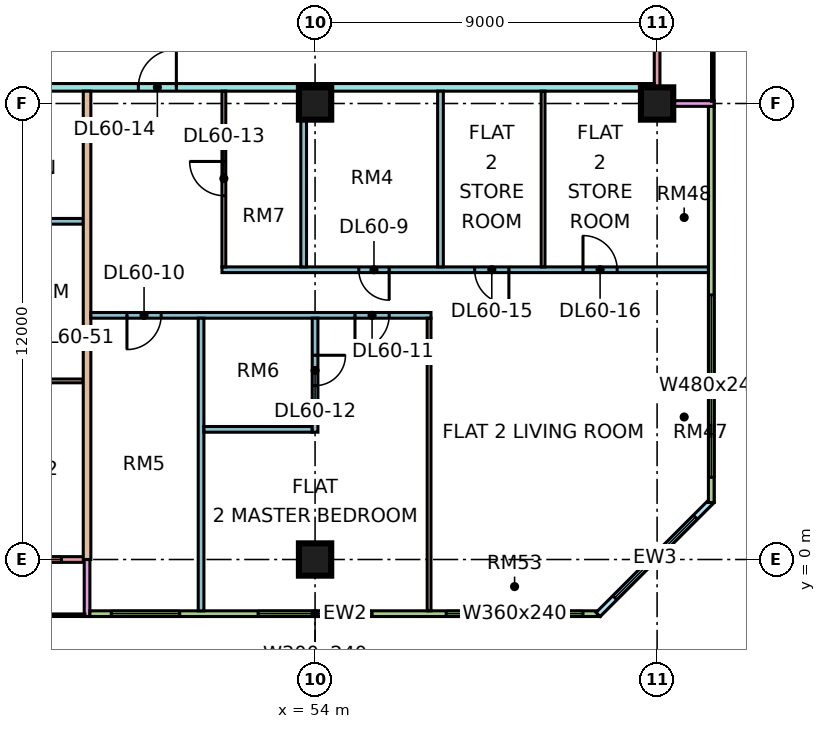
"""IFC4 building model, lengths in metres.
Left out: names, types, materials, properties, quantities, classifications, styles, units other than length and angle.
Written with IfcOpenShell. Run it as: python <this file> out.ifc"""

import sys

from ifc_helpers import new_model, si_unit, direction, frame, frame_2d, origin, origin_2d, place, context, subcontext, project, spatial, rectangle, extrude, element, fill, save


model = new_model("IFC4")
c1 = context("Model", 3, precision=1e-05, world=origin(), true_north=direction((0.0, 1.0)))
c2 = subcontext(c1, "Body", "Model", "MODEL_VIEW")
j1 = project(units=[si_unit("LENGTHUNIT", "METRE"), si_unit("PLANEANGLEUNIT", "RADIAN")], contexts=[c1])
p1 = place(None, origin())
s1 = spatial("IfcSite", under=j1, at=p1, CompositionType="ELEMENT")
p2 = place(p1, origin())
s2 = spatial("IfcBuilding", under=s1, at=p2, CompositionType="ELEMENT")
p3 = place(p2, frame((0.0, 0.0, 252.9)))
s3 = spatial("IfcBuildingStorey", under=s2, at=p3, CompositionType="ELEMENT", Elevation=252.9)
for number, where, z_axis, x_axis in (
    (1, (54.0, 0.0, 0.0), (0.0, 0.0, 1.0), (1.0, 0.0, 0.0)),
    (2, (54.0, 12.0, 0.0), (0.0, 0.0, 1.0), (1.0, 0.0, 0.0)),
    (3, (63.0, 12.0, 0.0), (0.0, 0.0, 1.0), (1.0, 0.0, 0.0)),
):
    element("IfcColumn", number, at=place(p3, frame(where, z_axis=z_axis, x_axis=x_axis)), inside=s3, PredefinedType="COLUMN", context=c2, shape_type="SweptSolid", body=[
        extrude(rectangle(XDim=0.85, YDim=0.85, at=origin_2d()), origin(), (0.0, 0.0, 1.0), 3.75),
    ])
p4 = place(p3, frame((36.075, 0.0, 0.0), z_axis=(0.0, 0.0, 1.0), x_axis=(1.0, 0.0, 0.0)))
e4 = element("IfcWall", 4, at=p4, inside=s3, PredefinedType="SOLIDWALL", context=c2, shape_type="SweptSolid", body=[
    extrude(rectangle(XDim=11.85, YDim=0.15, at=frame_2d((5.925, 0.0))), origin(), (0.0, 0.0, 1.0), 3.3),
])
p5 = place(p4, frame((2.288, 0.0, 0.0)))
e5 = element("IfcOpeningElement", 5, at=p5, cuts=e4, PredefinedType="OPENING", context=c2, shape_type="SweptSolid", body=[
    extrude(rectangle(XDim=1.8, YDim=2.4, at=frame_2d((0.9, 1.2))), frame((0.0, 0.085, 0.0), z_axis=(0.0, -1.0, 0.0), x_axis=(1.0, 0.0, 0.0)), (0.0, 0.0, 1.0), 0.17),
])
p6 = place(p4, frame((6.562, 0.0, 0.45)))
e6 = element("IfcOpeningElement", 6, at=p6, cuts=e4, PredefinedType="OPENING", context=c2, shape_type="SweptSolid", body=[
    extrude(rectangle(XDim=1.2, YDim=2.4, at=frame_2d((0.6, 1.2))), frame((0.0, 0.085, 0.0), z_axis=(0.0, -1.0, 0.0), x_axis=(1.0, 0.0, 0.0)), (0.0, 0.0, 1.0), 0.17),
])
p7 = place(p4, frame((10.05, 0.0, 0.45)))
e7 = element("IfcOpeningElement", 7, at=p7, cuts=e4, PredefinedType="OPENING", context=c2, shape_type="SweptSolid", body=[
    extrude(rectangle(XDim=1.2, YDim=2.4, at=frame_2d((0.6, 1.2))), frame((0.0, 0.085, 0.0), z_axis=(0.0, -1.0, 0.0), x_axis=(1.0, 0.0, 0.0)), (0.0, 0.0, 1.0), 0.17),
])
p8 = place(p3, frame((48.0, -1.5, 0.0), z_axis=(0.0, 0.0, 1.0), x_axis=(0.0, 1.0, 0.0)))
e8 = element("IfcWall", 8, at=p8, inside=s3, PredefinedType="SOLIDWALL", context=c2, shape_type="SweptSolid", body=[
    extrude(rectangle(XDim=1.5, YDim=0.15, at=frame_2d((0.75, 0.0))), origin(), (0.0, 0.0, 1.0), 3.3),
])
p9 = place(p3, frame((48.075, -1.425, 0.0), z_axis=(0.0, 0.0, 1.0), x_axis=(1.0, 0.0, 0.0)))
e9 = element("IfcWall", 9, at=p9, inside=s3, PredefinedType="SOLIDWALL", context=c2, shape_type="SweptSolid", body=[
    extrude(rectangle(XDim=13.425, YDim=0.15, at=frame_2d((6.712, 0.0))), origin(), (0.0, 0.0, 1.0), 3.3),
])
p10 = place(p9, frame((0.562, 0.0, 0.45)))
e10 = element("IfcOpeningElement", 10, at=p10, cuts=e9, PredefinedType="OPENING", context=c2, shape_type="SweptSolid", body=[
    extrude(rectangle(XDim=1.8, YDim=2.4, at=frame_2d((0.9, 1.2))), frame((0.0, 0.085, 0.0), z_axis=(0.0, -1.0, 0.0), x_axis=(1.0, 0.0, 0.0)), (0.0, 0.0, 1.0), 0.17),
])
p11 = place(p9, frame((4.425, 0.0, 0.45)))
e11 = element("IfcOpeningElement", 11, at=p11, cuts=e9, PredefinedType="OPENING", context=c2, shape_type="SweptSolid", body=[
    extrude(rectangle(XDim=3.0, YDim=2.4, at=frame_2d((1.5, 1.2))), frame((0.0, 0.085, 0.0), z_axis=(0.0, -1.0, 0.0), x_axis=(1.0, 0.0, 0.0)), (0.0, 0.0, 1.0), 0.17),
])
p12 = place(p9, frame((9.375, 0.0, 0.45)))
e12 = element("IfcOpeningElement", 12, at=p12, cuts=e9, PredefinedType="OPENING", context=c2, shape_type="SweptSolid", body=[
    extrude(rectangle(XDim=3.6, YDim=2.4, at=frame_2d((1.8, 1.2))), frame((0.0, 0.085, 0.0), z_axis=(0.0, -1.0, 0.0), x_axis=(1.0, 0.0, 0.0)), (0.0, 0.0, 1.0), 0.17),
])
p13 = place(p3, frame((61.447, -1.447, 0.0), z_axis=(0.0, 0.0, 1.0), x_axis=(0.707106781187, 0.707106781187, 0.0)))
e13 = element("IfcWall", 13, at=p13, inside=s3, PredefinedType="SOLIDWALL", context=c2, shape_type="SweptSolid", body=[
    extrude(rectangle(XDim=4.243, YDim=0.15, at=frame_2d((2.121, 0.0))), origin(), (0.0, 0.0, 1.0), 3.3),
])
p14 = place(p13, frame((0.621, 0.0, 0.45)))
e14 = element("IfcOpeningElement", 14, at=p14, cuts=e13, PredefinedType="OPENING", context=c2, shape_type="SweptSolid", body=[
    extrude(rectangle(XDim=3.0, YDim=2.4, at=frame_2d((1.5, 1.2))), frame((0.0, 0.085, 0.0), z_axis=(0.0, -1.0, 0.0), x_axis=(1.0, 0.0, 0.0)), (0.0, 0.0, 1.0), 0.17),
])
p15 = place(p3, frame((64.425, 1.5, 0.0), z_axis=(0.0, 0.0, 1.0), x_axis=(0.0, 1.0, 0.0)))
e15 = element("IfcWall", 15, at=p15, inside=s3, PredefinedType="SOLIDWALL", context=c2, shape_type="SweptSolid", body=[
    extrude(rectangle(XDim=10.425, YDim=0.15, at=frame_2d((5.212, 0.0))), origin(), (0.0, 0.0, 1.0), 3.3),
])
p16 = place(p15, frame((0.663, 0.0, 0.45)))
e16 = element("IfcOpeningElement", 16, at=p16, cuts=e15, PredefinedType="OPENING", context=c2, shape_type="SweptSolid", body=[
    extrude(rectangle(XDim=4.8, YDim=2.4, at=frame_2d((2.4, 1.2))), frame((0.0, 0.085, 0.0), z_axis=(0.0, -1.0, 0.0), x_axis=(1.0, 0.0, 0.0)), (0.0, 0.0, 1.0), 0.17),
])
p17 = place(p3, frame((63.0, 12.075, 0.0), z_axis=(0.0, 0.0, 1.0), x_axis=(0.0, 1.0, 0.0)))
e17 = element("IfcWall", 17, at=p17, inside=s3, PredefinedType="SOLIDWALL", context=c2, shape_type="SweptSolid", body=[
    extrude(rectangle(XDim=10.35, YDim=0.15, at=frame_2d((5.175, 0.0))), origin(), (0.0, 0.0, 1.0), 3.3),
])
p18 = place(p17, frame((4.875, 0.0, 0.0)))
e18 = element("IfcOpeningElement", 18, at=p18, cuts=e17, PredefinedType="OPENING", context=c2, shape_type="SweptSolid", body=[
    extrude(rectangle(XDim=1.8, YDim=2.4, at=frame_2d((0.9, 1.2))), frame((0.0, 0.085, 0.0), z_axis=(0.0, -1.0, 0.0), x_axis=(1.0, 0.0, 0.0)), (0.0, 0.0, 1.0), 0.17),
])
p19 = place(p17, frame((8.587, 0.0, 0.45)))
e19 = element("IfcOpeningElement", 19, at=p19, cuts=e17, PredefinedType="OPENING", context=c2, shape_type="SweptSolid", body=[
    extrude(rectangle(XDim=1.2, YDim=2.4, at=frame_2d((0.6, 1.2))), frame((0.0, 0.085, 0.0), z_axis=(0.0, -1.0, 0.0), x_axis=(1.0, 0.0, 0.0)), (0.0, 0.0, 1.0), 0.17),
])
p20 = place(p3, frame((64.5, 12.0, 0.0), z_axis=(0.0, 0.0, 1.0), x_axis=(-1.0, 0.0, 0.0)))
e20 = element("IfcWall", 20, at=p20, inside=s3, PredefinedType="SOLIDWALL", context=c2, shape_type="SweptSolid", body=[
    extrude(rectangle(XDim=1.5, YDim=0.15, at=frame_2d((0.75, 0.0))), origin(), (0.0, 0.0, 1.0), 3.3),
])
p21 = place(p3, frame((33.05, 4.7, 0.0), z_axis=(0.0, 0.0, 1.0), x_axis=(1.0, 0.0, 0.0)))
e21 = element("IfcWall", 21, at=p21, inside=s3, PredefinedType="PARTITIONING", context=c2, shape_type="SweptSolid", body=[
    extrude(rectangle(XDim=14.85, YDim=0.1, at=frame_2d((7.425, 0.0))), origin(), (0.0, 0.0, 1.0), 3.3),
])
p22 = place(p21, frame((10.0, 0.0, 0.0)))
e22 = element("IfcOpeningElement", 22, at=p22, cuts=e21, PredefinedType="OPENING", context=c2, shape_type="SweptSolid", body=[
    extrude(rectangle(XDim=0.9, YDim=2.1, at=frame_2d((0.45, 1.05))), frame((0.0, 0.06, 0.0), z_axis=(0.0, -1.0, 0.0), x_axis=(1.0, 0.0, 0.0)), (0.0, 0.0, 1.0), 0.12),
])
p23 = place(p21, frame((13.0, 0.0, 0.0)))
e23 = element("IfcOpeningElement", 23, at=p23, cuts=e21, PredefinedType="OPENING", context=c2, shape_type="SweptSolid", body=[
    extrude(rectangle(XDim=0.9, YDim=2.1, at=frame_2d((0.45, 1.05))), frame((0.0, 0.06, 0.0), z_axis=(0.0, -1.0, 0.0), x_axis=(1.0, 0.0, 0.0)), (0.0, 0.0, 1.0), 0.12),
])
p24 = place(p21, frame((4.0, 0.0, 0.0)))
e24 = element("IfcOpeningElement", 24, at=p24, cuts=e21, PredefinedType="OPENING", context=c2, shape_type="SweptSolid", body=[
    extrude(rectangle(XDim=0.9, YDim=2.1, at=frame_2d((0.45, 1.05))), frame((0.0, 0.06, 0.0), z_axis=(0.0, -1.0, 0.0), x_axis=(1.0, 0.0, 0.0)), (0.0, 0.0, 1.0), 0.12),
])
p25 = place(p3, frame((40.65, 12.425, 0.0), z_axis=(0.0, 0.0, 1.0), x_axis=(1.0, 0.0, 0.0)))
e25 = element("IfcWall", 25, at=p25, inside=s3, PredefinedType="PARTITIONING", context=c2, shape_type="SweptSolid", body=[
    extrude(rectangle(XDim=22.276, YDim=0.2, at=frame_2d((11.138, 0.0))), origin(), (0.0, 0.0, 1.0), 3.3),
])
p26 = place(p25, frame((8.7, 0.0, 0.0)))
e26 = element("IfcOpeningElement", 26, at=p26, cuts=e25, PredefinedType="OPENING", context=c2, shape_type="SweptSolid", body=[
    extrude(rectangle(XDim=1.0, YDim=2.1, at=frame_2d((0.5, 1.05))), frame((0.0, 0.11, 0.0), z_axis=(0.0, -1.0, 0.0), x_axis=(1.0, 0.0, 0.0)), (0.0, 0.0, 1.0), 0.22),
])
p27 = place(p25, frame((1.05, 0.0, 0.0)))
e27 = element("IfcOpeningElement", 27, at=p27, cuts=e25, PredefinedType="OPENING", context=c2, shape_type="SweptSolid", body=[
    extrude(rectangle(XDim=1.0, YDim=2.1, at=frame_2d((0.5, 1.05))), frame((0.0, 0.11, 0.0), z_axis=(0.0, -1.0, 0.0), x_axis=(1.0, 0.0, 0.0)), (0.0, 0.0, 1.0), 0.22),
])
p28 = place(p3, frame((43.725, 5.9, 0.0), z_axis=(0.0, 0.0, 1.0), x_axis=(1.0, 0.0, 0.0)))
e28 = element("IfcWall", 28, at=p28, inside=s3, PredefinedType="PARTITIONING", context=c2, shape_type="SweptSolid", body=[
    extrude(rectangle(XDim=4.175, YDim=0.15, at=frame_2d((2.087, 0.0))), origin(), (0.0, 0.0, 1.0), 3.3),
])
p29 = place(p28, frame((1.675, 0.0, 0.0)))
e29 = element("IfcOpeningElement", 29, at=p29, cuts=e28, PredefinedType="OPENING", context=c2, shape_type="SweptSolid", body=[
    extrude(rectangle(XDim=0.8, YDim=2.1, at=frame_2d((0.4, 1.05))), frame((0.0, 0.085, 0.0), z_axis=(0.0, -1.0, 0.0), x_axis=(1.0, 0.0, 0.0)), (0.0, 0.0, 1.0), 0.17),
])
p30 = place(p3, frame((43.725, 8.9, 0.0), z_axis=(0.0, 0.0, 1.0), x_axis=(1.0, 0.0, 0.0)))
e30 = element("IfcWall", 30, at=p30, inside=s3, PredefinedType="PARTITIONING", context=c2, shape_type="SweptSolid", body=[
    extrude(rectangle(XDim=4.175, YDim=0.15, at=frame_2d((2.087, 0.0))), origin(), (0.0, 0.0, 1.0), 3.3),
])
p31 = place(p3, frame((48.0, 0.0, 0.0), z_axis=(0.0, 0.0, 1.0), x_axis=(0.0, 1.0, 0.0)))
e31 = element("IfcWall", 31, at=p31, inside=s3, PredefinedType="PARTITIONING", context=c2, shape_type="SweptSolid", body=[
    extrude(rectangle(XDim=12.325, YDim=0.2, at=frame_2d((6.163, 0.0))), origin(), (0.0, 0.0, 1.0), 3.3),
])
p32 = place(p3, frame((48.1, 6.425, 0.0), z_axis=(0.0, 0.0, 1.0), x_axis=(1.0, 0.0, 0.0)))
e32 = element("IfcWall", 32, at=p32, inside=s3, PredefinedType="PARTITIONING", context=c2, shape_type="SweptSolid", body=[
    extrude(rectangle(XDim=8.95, YDim=0.15, at=frame_2d((4.475, 0.0))), origin(), (0.0, 0.0, 1.0), 3.3),
])
p33 = place(p32, frame((0.95, 0.0, 0.0)))
e33 = element("IfcOpeningElement", 33, at=p33, cuts=e32, PredefinedType="OPENING", context=c2, shape_type="SweptSolid", body=[
    extrude(rectangle(XDim=0.9, YDim=2.1, at=frame_2d((0.45, 1.05))), frame((0.0, 0.085, 0.0), z_axis=(0.0, -1.0, 0.0), x_axis=(1.0, 0.0, 0.0)), (0.0, 0.0, 1.0), 0.17),
])
p34 = place(p32, frame((6.95, 0.0, 0.0)))
e34 = element("IfcOpeningElement", 34, at=p34, cuts=e32, PredefinedType="OPENING", context=c2, shape_type="SweptSolid", body=[
    extrude(rectangle(XDim=0.9, YDim=2.1, at=frame_2d((0.45, 1.05))), frame((0.0, 0.085, 0.0), z_axis=(0.0, -1.0, 0.0), x_axis=(1.0, 0.0, 0.0)), (0.0, 0.0, 1.0), 0.17),
])
p35 = place(p3, frame((51.0, -1.351, 0.0), z_axis=(0.0, 0.0, 1.0), x_axis=(0.0, 1.0, 0.0)))
e35 = element("IfcWall", 35, at=p35, inside=s3, PredefinedType="PARTITIONING", context=c2, shape_type="SweptSolid", body=[
    extrude(rectangle(XDim=7.701, YDim=0.15, at=frame_2d((3.851, 0.0))), origin(), (0.0, 0.0, 1.0), 3.3),
])
p36 = place(p3, frame((51.075, 3.425, 0.0), z_axis=(0.0, 0.0, 1.0), x_axis=(1.0, 0.0, 0.0)))
e36 = element("IfcWall", 36, at=p36, inside=s3, PredefinedType="PARTITIONING", context=c2, shape_type="SweptSolid", body=[
    extrude(rectangle(XDim=2.85, YDim=0.15, at=frame_2d((1.425, 0.0))), origin(), (0.0, 0.0, 1.0), 3.3),
])
p37 = place(p3, frame((51.55, 7.625, 0.0), z_axis=(0.0, 0.0, 1.0), x_axis=(1.0, 0.0, 0.0)))
e37 = element("IfcWall", 37, at=p37, inside=s3, PredefinedType="PARTITIONING", context=c2, shape_type="SweptSolid", body=[
    extrude(rectangle(XDim=12.8, YDim=0.15, at=frame_2d((6.4, 0.0))), origin(), (0.0, 0.0, 1.0), 3.3),
])
p38 = place(p37, frame((3.6, 0.0, 0.0)))
e38 = element("IfcOpeningElement", 38, at=p38, cuts=e37, PredefinedType="OPENING", context=c2, shape_type="SweptSolid", body=[
    extrude(rectangle(XDim=0.8, YDim=2.1, at=frame_2d((0.4, 1.05))), frame((0.0, 0.085, 0.0), z_axis=(0.0, -1.0, 0.0), x_axis=(1.0, 0.0, 0.0)), (0.0, 0.0, 1.0), 0.17),
])
p39 = place(p37, frame((6.65, 0.0, 0.0)))
e39 = element("IfcOpeningElement", 39, at=p39, cuts=e37, PredefinedType="OPENING", context=c2, shape_type="SweptSolid", body=[
    extrude(rectangle(XDim=0.9, YDim=2.1, at=frame_2d((0.45, 1.05))), frame((0.0, 0.085, 0.0), z_axis=(0.0, -1.0, 0.0), x_axis=(1.0, 0.0, 0.0)), (0.0, 0.0, 1.0), 0.17),
])
p40 = place(p37, frame((9.5, 0.0, 0.0)))
e40 = element("IfcOpeningElement", 40, at=p40, cuts=e37, PredefinedType="OPENING", context=c2, shape_type="SweptSolid", body=[
    extrude(rectangle(XDim=0.9, YDim=2.1, at=frame_2d((0.45, 1.05))), frame((0.0, 0.085, 0.0), z_axis=(0.0, -1.0, 0.0), x_axis=(1.0, 0.0, 0.0)), (0.0, 0.0, 1.0), 0.17),
])
p41 = place(p3, frame((51.6, 7.7, 0.0), z_axis=(0.0, 0.0, 1.0), x_axis=(0.0, 1.0, 0.0)))
e41 = element("IfcWall", 41, at=p41, inside=s3, PredefinedType="PARTITIONING", context=c2, shape_type="SweptSolid", body=[
    extrude(rectangle(XDim=4.625, YDim=0.1, at=frame_2d((2.312, 0.0))), origin(), (0.0, 0.0, 1.0), 3.3),
])
p42 = place(p41, frame((1.875, 0.0, 0.0)))
e42 = element("IfcOpeningElement", 42, at=p42, cuts=e41, PredefinedType="OPENING", context=c2, shape_type="SweptSolid", body=[
    extrude(rectangle(XDim=0.9, YDim=2.1, at=frame_2d((0.45, 1.05))), frame((0.0, 0.06, 0.0), z_axis=(0.0, -1.0, 0.0), x_axis=(1.0, 0.0, 0.0)), (0.0, 0.0, 1.0), 0.12),
])
p43 = place(p3, frame((53.7, 7.7, 0.0), z_axis=(0.0, 0.0, 1.0), x_axis=(0.0, 1.0, 0.0)))
e43 = element("IfcWall", 43, at=p43, inside=s3, PredefinedType="PARTITIONING", context=c2, shape_type="SweptSolid", body=[
    extrude(rectangle(XDim=4.625, YDim=0.15, at=frame_2d((2.312, 0.0))), origin(), (0.0, 0.0, 1.0), 3.3),
])
p44 = place(p3, frame((54.0, 3.35, 0.0), z_axis=(0.0, 0.0, 1.0), x_axis=(0.0, 1.0, 0.0)))
e44 = element("IfcWall", 44, at=p44, inside=s3, PredefinedType="PARTITIONING", context=c2, shape_type="SweptSolid", body=[
    extrude(rectangle(XDim=3.0, YDim=0.15, at=frame_2d((1.5, 0.0))), origin(), (0.0, 0.0, 1.0), 3.3),
])
p45 = place(p44, frame((1.225, 0.0, 0.0)))
e45 = element("IfcOpeningElement", 45, at=p45, cuts=e44, PredefinedType="OPENING", context=c2, shape_type="SweptSolid", body=[
    extrude(rectangle(XDim=0.8, YDim=2.1, at=frame_2d((0.4, 1.05))), frame((0.0, 0.085, 0.0), z_axis=(0.0, -1.0, 0.0), x_axis=(1.0, 0.0, 0.0)), (0.0, 0.0, 1.0), 0.17),
])
p46 = place(p3, frame((57.0, -1.35, 0.0), z_axis=(0.0, 0.0, 1.0), x_axis=(0.0, 1.0, 0.0)))
e46 = element("IfcWall", 46, at=p46, inside=s3, PredefinedType="PARTITIONING", context=c2, shape_type="SweptSolid", body=[
    extrude(rectangle(XDim=7.7, YDim=0.1, at=frame_2d((3.85, 0.0))), origin(), (0.0, 0.0, 1.0), 3.3),
])
p47 = place(p3, frame((57.3, 7.7, 0.0), z_axis=(0.0, 0.0, 1.0), x_axis=(0.0, 1.0, 0.0)))
e47 = element("IfcWall", 47, at=p47, inside=s3, PredefinedType="PARTITIONING", context=c2, shape_type="SweptSolid", body=[
    extrude(rectangle(XDim=4.625, YDim=0.15, at=frame_2d((2.312, 0.0))), origin(), (0.0, 0.0, 1.0), 3.3),
])
p48 = place(p3, frame((60.0, 7.7, 0.0), z_axis=(0.0, 0.0, 1.0), x_axis=(0.0, 1.0, 0.0)))
e48 = element("IfcWall", 48, at=p48, inside=s3, PredefinedType="PARTITIONING", context=c2, shape_type="SweptSolid", body=[
    extrude(rectangle(XDim=4.625, YDim=0.1, at=frame_2d((2.312, 0.0))), origin(), (0.0, 0.0, 1.0), 3.3),
])
p49 = place(p7, origin())
e49 = element("IfcWindow", 49, at=p49, inside=s3, PartitioningType="SINGLE_PANEL", PredefinedType="WINDOW", context=c2, shape_type="SweptSolid", body=[
    extrude(rectangle(XDim=1.2, YDim=2.4, at=frame_2d((0.6, 1.2))), frame((0.0, 0.03, 0.0), z_axis=(0.0, -1.0, 0.0), x_axis=(1.0, 0.0, 0.0)), (0.0, 0.0, 1.0), 0.06),
])
fill(e7, e49)
p50 = place(p10, origin())
e50 = element("IfcWindow", 50, at=p50, inside=s3, PartitioningType="SINGLE_PANEL", PredefinedType="WINDOW", context=c2, shape_type="SweptSolid", body=[
    extrude(rectangle(XDim=1.8, YDim=2.4, at=frame_2d((0.9, 1.2))), frame((0.0, 0.03, 0.0), z_axis=(0.0, -1.0, 0.0), x_axis=(1.0, 0.0, 0.0)), (0.0, 0.0, 1.0), 0.06),
])
fill(e10, e50)
p51 = place(p11, origin())
e51 = element("IfcWindow", 51, at=p51, inside=s3, PartitioningType="SINGLE_PANEL", PredefinedType="WINDOW", context=c2, shape_type="SweptSolid", body=[
    extrude(rectangle(XDim=3.0, YDim=2.4, at=frame_2d((1.5, 1.2))), frame((0.0, 0.03, 0.0), z_axis=(0.0, -1.0, 0.0), x_axis=(1.0, 0.0, 0.0)), (0.0, 0.0, 1.0), 0.06),
])
fill(e11, e51)
p52 = place(p12, origin())
e52 = element("IfcWindow", 52, at=p52, inside=s3, PartitioningType="SINGLE_PANEL", PredefinedType="WINDOW", context=c2, shape_type="SweptSolid", body=[
    extrude(rectangle(XDim=3.6, YDim=2.4, at=frame_2d((1.8, 1.2))), frame((0.0, 0.03, 0.0), z_axis=(0.0, -1.0, 0.0), x_axis=(1.0, 0.0, 0.0)), (0.0, 0.0, 1.0), 0.06),
])
fill(e12, e52)
p53 = place(p14, origin())
e53 = element("IfcWindow", 53, at=p53, inside=s3, PartitioningType="SINGLE_PANEL", PredefinedType="WINDOW", context=c2, shape_type="SweptSolid", body=[
    extrude(rectangle(XDim=3.0, YDim=2.4, at=frame_2d((1.5, 1.2))), frame((0.0, 0.03, 0.0), z_axis=(0.0, -1.0, 0.0), x_axis=(1.0, 0.0, 0.0)), (0.0, 0.0, 1.0), 0.06),
])
fill(e14, e53)
p54 = place(p16, origin())
e54 = element("IfcWindow", 54, at=p54, inside=s3, PartitioningType="SINGLE_PANEL", PredefinedType="WINDOW", context=c2, shape_type="SweptSolid", body=[
    extrude(rectangle(XDim=4.8, YDim=2.4, at=frame_2d((2.4, 1.2))), frame((0.0, 0.03, 0.0), z_axis=(0.0, -1.0, 0.0), x_axis=(1.0, 0.0, 0.0)), (0.0, 0.0, 1.0), 0.06),
])
fill(e16, e54)
p55 = place(p38, origin())
e55 = element("IfcDoor", 55, at=p55, inside=s3, OperationType="SINGLE_SWING_RIGHT", PredefinedType="DOOR", context=c2, shape_type="SweptSolid", body=[
    extrude(rectangle(XDim=0.8, YDim=2.1, at=frame_2d((0.4, 1.05))), frame((0.0, 0.025, 0.0), z_axis=(0.0, -1.0, 0.0), x_axis=(1.0, 0.0, 0.0)), (0.0, 0.0, 1.0), 0.05),
])
fill(e38, e55)
p56 = place(p33, frame((0.9, 0.0, 0.0), z_axis=(0.0, 0.0, 1.0), x_axis=(-1.0, 0.0, 0.0)))
e56 = element("IfcDoor", 56, at=p56, inside=s3, OperationType="SINGLE_SWING_LEFT", PredefinedType="DOOR", context=c2, shape_type="SweptSolid", body=[
    extrude(rectangle(XDim=0.9, YDim=2.1, at=frame_2d((0.45, 1.05))), frame((0.0, 0.025, 0.0), z_axis=(0.0, -1.0, 0.0), x_axis=(1.0, 0.0, 0.0)), (0.0, 0.0, 1.0), 0.05),
])
fill(e33, e56)
p57 = place(p34, frame((0.9, 0.0, 0.0), z_axis=(0.0, 0.0, 1.0), x_axis=(-1.0, 0.0, 0.0)))
e57 = element("IfcDoor", 57, at=p57, inside=s3, OperationType="SINGLE_SWING_LEFT", PredefinedType="DOOR", context=c2, shape_type="SweptSolid", body=[
    extrude(rectangle(XDim=0.9, YDim=2.1, at=frame_2d((0.45, 1.05))), frame((0.0, 0.025, 0.0), z_axis=(0.0, -1.0, 0.0), x_axis=(1.0, 0.0, 0.0)), (0.0, 0.0, 1.0), 0.05),
])
fill(e34, e57)
p58 = place(p45, origin())
e58 = element("IfcDoor", 58, at=p58, inside=s3, OperationType="SINGLE_SWING_RIGHT", PredefinedType="DOOR", context=c2, shape_type="SweptSolid", body=[
    extrude(rectangle(XDim=0.8, YDim=2.1, at=frame_2d((0.4, 1.05))), frame((0.0, 0.025, 0.0), z_axis=(0.0, -1.0, 0.0), x_axis=(1.0, 0.0, 0.0)), (0.0, 0.0, 1.0), 0.05),
])
fill(e45, e58)
p59 = place(p42, frame((0.9, 0.0, 0.0), z_axis=(0.0, 0.0, 1.0), x_axis=(-1.0, 0.0, 0.0)))
e59 = element("IfcDoor", 59, at=p59, inside=s3, OperationType="SINGLE_SWING_RIGHT", PredefinedType="DOOR", context=c2, shape_type="SweptSolid", body=[
    extrude(rectangle(XDim=0.9, YDim=2.1, at=frame_2d((0.45, 1.05))), frame((0.0, 0.025, 0.0), z_axis=(0.0, -1.0, 0.0), x_axis=(1.0, 0.0, 0.0)), (0.0, 0.0, 1.0), 0.05),
])
fill(e42, e59)
p60 = place(p26, frame((1.0, 0.0, 0.0), z_axis=(0.0, 0.0, 1.0), x_axis=(-1.0, 0.0, 0.0)))
e60 = element("IfcDoor", 60, at=p60, inside=s3, OperationType="SINGLE_SWING_RIGHT", PredefinedType="DOOR", context=c2, shape_type="SweptSolid", body=[
    extrude(rectangle(XDim=1.0, YDim=2.1, at=frame_2d((0.5, 1.05))), frame((0.0, 0.025, 0.0), z_axis=(0.0, -1.0, 0.0), x_axis=(1.0, 0.0, 0.0)), (0.0, 0.0, 1.0), 0.05),
])
fill(e26, e60)
p61 = place(p39, origin())
e61 = element("IfcDoor", 61, at=p61, inside=s3, OperationType="SINGLE_SWING_RIGHT", PredefinedType="DOOR", context=c2, shape_type="SweptSolid", body=[
    extrude(rectangle(XDim=0.9, YDim=2.1, at=frame_2d((0.45, 1.05))), frame((0.0, 0.025, 0.0), z_axis=(0.0, -1.0, 0.0), x_axis=(1.0, 0.0, 0.0)), (0.0, 0.0, 1.0), 0.05),
])
fill(e39, e61)
p62 = place(p40, origin())
e62 = element("IfcDoor", 62, at=p62, inside=s3, OperationType="SINGLE_SWING_LEFT", PredefinedType="DOOR", context=c2, shape_type="SweptSolid", body=[
    extrude(rectangle(XDim=0.9, YDim=2.1, at=frame_2d((0.45, 1.05))), frame((0.0, 0.025, 0.0), z_axis=(0.0, -1.0, 0.0), x_axis=(1.0, 0.0, 0.0)), (0.0, 0.0, 1.0), 0.05),
])
fill(e40, e62)
save(model, sys.argv[1])
